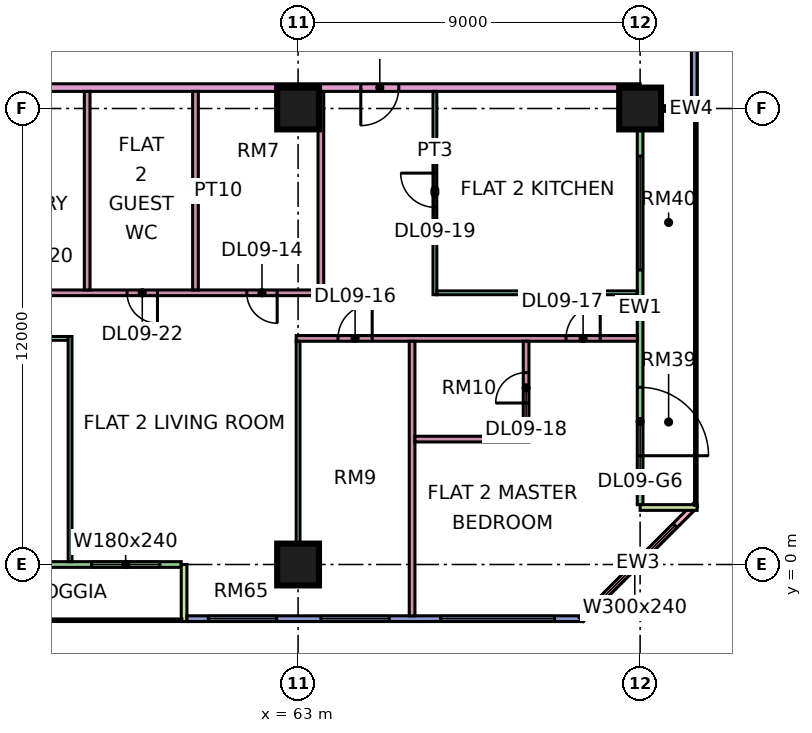
"""IFC4 building model, lengths in metres.
Left out: names, types, materials, properties, quantities, classifications, styles, units other than length and angle.
Written with IfcOpenShell. Run it as: python <this file> out.ifc"""

import sys

from ifc_helpers import new_model, si_unit, direction, frame, frame_2d, origin, origin_2d, place, context, subcontext, project, spatial, rectangle, extrude, element, fill, save


model = new_model("IFC4")
c1 = context("Model", 3, precision=1e-05, world=origin(), true_north=direction((0.0, 1.0)))
c2 = subcontext(c1, "Body", "Model", "MODEL_VIEW")
j1 = project(units=[si_unit("LENGTHUNIT", "METRE"), si_unit("PLANEANGLEUNIT", "RADIAN")], contexts=[c1])
p1 = place(None, origin())
s1 = spatial("IfcSite", under=j1, at=p1, CompositionType="ELEMENT")
p2 = place(p1, origin())
s2 = spatial("IfcBuilding", under=s1, at=p2, CompositionType="ELEMENT")
p3 = place(p2, frame((0.0, 0.0, 48.9)))
s3 = spatial("IfcBuildingStorey", under=s2, at=p3, CompositionType="ELEMENT", Elevation=48.9)
for number, where, z_axis, x_axis in (
    (1, (63.0, 0.0, 0.0), (0.0, 0.0, 1.0), (1.0, 0.0, 0.0)),
    (2, (63.0, 12.0, 0.0), (0.0, 0.0, 1.0), (1.0, 0.0, 0.0)),
    (3, (72.0, 12.0, 0.0), (0.0, 0.0, 1.0), (1.0, 0.0, 0.0)),
):
    element("IfcColumn", number, at=place(p3, frame(where, z_axis=z_axis, x_axis=x_axis)), inside=s3, PredefinedType="COLUMN", context=c2, shape_type="SweptSolid", body=[
        extrude(rectangle(XDim=1.1, YDim=1.1, at=origin_2d()), origin(), (0.0, 0.0, 1.0), 3.75),
    ])
p4 = place(p3, frame((48.075, 0.0, 0.0), z_axis=(0.0, 0.0, 1.0), x_axis=(1.0, 0.0, 0.0)))
e4 = element("IfcWall", 4, at=p4, inside=s3, PredefinedType="SOLIDWALL", context=c2, shape_type="SweptSolid", body=[
    extrude(rectangle(XDim=11.85, YDim=0.15, at=frame_2d((5.925, 0.0))), origin(), (0.0, 0.0, 1.0), 3.35),
])
p5 = place(p4, frame((0.562, 0.0, 0.45)))
e5 = element("IfcOpeningElement", 5, at=p5, cuts=e4, PredefinedType="OPENING", context=c2, shape_type="SweptSolid", body=[
    extrude(rectangle(XDim=1.8, YDim=2.4, at=frame_2d((0.9, 1.2))), frame((0.0, 0.085, 0.0), z_axis=(0.0, -1.0, 0.0), x_axis=(1.0, 0.0, 0.0)), (0.0, 0.0, 1.0), 0.17),
])
p6 = place(p4, frame((3.5, 0.0, 0.45)))
e6 = element("IfcOpeningElement", 6, at=p6, cuts=e4, PredefinedType="OPENING", context=c2, shape_type="SweptSolid", body=[
    extrude(rectangle(XDim=1.2, YDim=2.4, at=frame_2d((0.6, 1.2))), frame((0.0, 0.085, 0.0), z_axis=(0.0, -1.0, 0.0), x_axis=(1.0, 0.0, 0.0)), (0.0, 0.0, 1.0), 0.17),
])
p7 = place(p4, frame((7.15, 0.0, 0.45)))
e7 = element("IfcOpeningElement", 7, at=p7, cuts=e4, PredefinedType="OPENING", context=c2, shape_type="SweptSolid", body=[
    extrude(rectangle(XDim=1.2, YDim=2.4, at=frame_2d((0.6, 1.2))), frame((0.0, 0.085, 0.0), z_axis=(0.0, -1.0, 0.0), x_axis=(1.0, 0.0, 0.0)), (0.0, 0.0, 1.0), 0.17),
])
p8 = place(p4, frame((9.488, 0.0, 0.45)))
e8 = element("IfcOpeningElement", 8, at=p8, cuts=e4, PredefinedType="OPENING", context=c2, shape_type="SweptSolid", body=[
    extrude(rectangle(XDim=1.8, YDim=2.4, at=frame_2d((0.9, 1.2))), frame((0.0, 0.085, 0.0), z_axis=(0.0, -1.0, 0.0), x_axis=(1.0, 0.0, 0.0)), (0.0, 0.0, 1.0), 0.17),
])
p9 = place(p3, frame((60.0, -1.5, 0.0), z_axis=(0.0, 0.0, 1.0), x_axis=(0.0, 1.0, 0.0)))
e9 = element("IfcWall", 9, at=p9, inside=s3, PredefinedType="SOLIDWALL", context=c2, shape_type="SweptSolid", body=[
    extrude(rectangle(XDim=1.5, YDim=0.15, at=frame_2d((0.75, 0.0))), origin(), (0.0, 0.0, 1.0), 3.35),
])
p10 = place(p3, frame((60.075, -1.425, 0.0), z_axis=(0.0, 0.0, 1.0), x_axis=(1.0, 0.0, 0.0)))
e10 = element("IfcWall", 10, at=p10, inside=s3, PredefinedType="SOLIDWALL", context=c2, shape_type="SweptSolid", body=[
    extrude(rectangle(XDim=10.425, YDim=0.15, at=frame_2d((5.212, 0.0))), origin(), (0.0, 0.0, 1.0), 3.35),
])
p11 = place(p10, frame((0.562, 0.0, 0.45)))
e11 = element("IfcOpeningElement", 11, at=p11, cuts=e10, PredefinedType="OPENING", context=c2, shape_type="SweptSolid", body=[
    extrude(rectangle(XDim=1.8, YDim=2.4, at=frame_2d((0.9, 1.2))), frame((0.0, 0.085, 0.0), z_axis=(0.0, -1.0, 0.0), x_axis=(1.0, 0.0, 0.0)), (0.0, 0.0, 1.0), 0.17),
])
p12 = place(p10, frame((3.525, 0.0, 0.45)))
e12 = element("IfcOpeningElement", 12, at=p12, cuts=e10, PredefinedType="OPENING", context=c2, shape_type="SweptSolid", body=[
    extrude(rectangle(XDim=1.8, YDim=2.4, at=frame_2d((0.9, 1.2))), frame((0.0, 0.085, 0.0), z_axis=(0.0, -1.0, 0.0), x_axis=(1.0, 0.0, 0.0)), (0.0, 0.0, 1.0), 0.17),
])
p13 = place(p10, frame((6.675, 0.0, 0.45)))
e13 = element("IfcOpeningElement", 13, at=p13, cuts=e10, PredefinedType="OPENING", context=c2, shape_type="SweptSolid", body=[
    extrude(rectangle(XDim=3.0, YDim=2.4, at=frame_2d((1.5, 1.2))), frame((0.0, 0.085, 0.0), z_axis=(0.0, -1.0, 0.0), x_axis=(1.0, 0.0, 0.0)), (0.0, 0.0, 1.0), 0.17),
])
p14 = place(p3, frame((70.447, -1.447, 0.0), z_axis=(0.0, 0.0, 1.0), x_axis=(0.707106781187, 0.707106781187, 0.0)))
e14 = element("IfcWall", 14, at=p14, inside=s3, PredefinedType="SOLIDWALL", context=c2, shape_type="SweptSolid", body=[
    extrude(rectangle(XDim=4.243, YDim=0.15, at=frame_2d((2.121, 0.0))), origin(), (0.0, 0.0, 1.0), 3.35),
])
p15 = place(p14, frame((0.498, 0.0, 0.45)))
e15 = element("IfcOpeningElement", 15, at=p15, cuts=e14, PredefinedType="OPENING", context=c2, shape_type="SweptSolid", body=[
    extrude(rectangle(XDim=3.0, YDim=2.4, at=frame_2d((1.5, 1.2))), frame((0.0, 0.085, 0.0), z_axis=(0.0, -1.0, 0.0), x_axis=(1.0, 0.0, 0.0)), (0.0, 0.0, 1.0), 0.17),
])
p16 = place(p3, frame((72.0, 1.575, 0.0), z_axis=(0.0, 0.0, 1.0), x_axis=(0.0, 1.0, 0.0)))
e16 = element("IfcWall", 16, at=p16, inside=s3, PredefinedType="SOLIDWALL", context=c2, shape_type="SweptSolid", body=[
    extrude(rectangle(XDim=10.35, YDim=0.15, at=frame_2d((5.175, 0.0))), origin(), (0.0, 0.0, 1.0), 3.35),
])
p17 = place(p16, frame((1.288, 0.0, 0.0)))
e17 = element("IfcOpeningElement", 17, at=p17, cuts=e16, PredefinedType="OPENING", context=c2, shape_type="SweptSolid", body=[
    extrude(rectangle(XDim=1.8, YDim=2.4, at=frame_2d((0.9, 1.2))), frame((0.0, 0.085, 0.0), z_axis=(0.0, -1.0, 0.0), x_axis=(1.0, 0.0, 0.0)), (0.0, 0.0, 1.0), 0.17),
])
p18 = place(p16, frame((6.175, 0.0, 0.45)))
e18 = element("IfcOpeningElement", 18, at=p18, cuts=e16, PredefinedType="OPENING", context=c2, shape_type="SweptSolid", body=[
    extrude(rectangle(XDim=3.0, YDim=2.4, at=frame_2d((1.5, 1.2))), frame((0.0, 0.085, 0.0), z_axis=(0.0, -1.0, 0.0), x_axis=(1.0, 0.0, 0.0)), (0.0, 0.0, 1.0), 0.17),
])
for number, where, z_axis, x_axis in (
    (19, (73.5, 1.5, 0.0), (0.0, 0.0, 1.0), (-1.0, 0.0, 0.0)),
    (20, (73.5, 12.0, 0.0), (0.0, 0.0, 1.0), (-1.0, 0.0, 0.0)),
):
    element("IfcWall", number, at=place(p3, frame(where, z_axis=z_axis, x_axis=x_axis)), inside=s3, PredefinedType="SOLIDWALL", context=c2, shape_type="SweptSolid", body=[
        extrude(rectangle(XDim=1.5, YDim=0.15, at=frame_2d((0.75, 0.0))), origin(), (0.0, 0.0, 1.0), 3.35),
    ])
p19 = place(p3, frame((73.425, 12.075, 0.0), z_axis=(0.0, 0.0, 1.0), x_axis=(0.0, 1.0, 0.0)))
e21 = element("IfcWall", 21, at=p19, inside=s3, PredefinedType="SOLIDWALL", context=c2, shape_type="SweptSolid", body=[
    extrude(rectangle(XDim=10.425, YDim=0.15, at=frame_2d((5.212, 0.0))), origin(), (0.0, 0.0, 1.0), 3.35),
])
p20 = place(p19, frame((8.025, 0.0, 0.45)))
e22 = element("IfcOpeningElement", 22, at=p20, cuts=e21, PredefinedType="OPENING", context=c2, shape_type="SweptSolid", body=[
    extrude(rectangle(XDim=1.8, YDim=2.4, at=frame_2d((0.9, 1.2))), frame((0.0, 0.085, 0.0), z_axis=(0.0, -1.0, 0.0), x_axis=(1.0, 0.0, 0.0)), (0.0, 0.0, 1.0), 0.17),
])
p21 = place(p3, frame((40.65, 12.55, 0.0), z_axis=(0.0, 0.0, 1.0), x_axis=(1.0, 0.0, 0.0)))
e23 = element("IfcWall", 23, at=p21, inside=s3, PredefinedType="PARTITIONING", context=c2, shape_type="SweptSolid", body=[
    extrude(rectangle(XDim=31.35, YDim=0.2, at=frame_2d((15.675, 0.0))), origin(), (0.0, 0.0, 1.0), 3.35),
])
p22 = place(p21, frame((24.0, 0.0, 0.0)))
e24 = element("IfcOpeningElement", 24, at=p22, cuts=e23, PredefinedType="OPENING", context=c2, shape_type="SweptSolid", body=[
    extrude(rectangle(XDim=1.0, YDim=2.1, at=frame_2d((0.5, 1.05))), frame((0.0, 0.11, 0.0), z_axis=(0.0, -1.0, 0.0), x_axis=(1.0, 0.0, 0.0)), (0.0, 0.0, 1.0), 0.22),
])
p23 = place(p21, frame((1.05, 0.0, 0.0)))
e25 = element("IfcOpeningElement", 25, at=p23, cuts=e23, PredefinedType="OPENING", context=c2, shape_type="SweptSolid", body=[
    extrude(rectangle(XDim=1.0, YDim=2.1, at=frame_2d((0.5, 1.05))), frame((0.0, 0.11, 0.0), z_axis=(0.0, -1.0, 0.0), x_axis=(1.0, 0.0, 0.0)), (0.0, 0.0, 1.0), 0.22),
])
p24 = place(p3, frame((54.1, 5.95, 0.0), z_axis=(0.0, 0.0, 1.0), x_axis=(1.0, 0.0, 0.0)))
e26 = element("IfcWall", 26, at=p24, inside=s3, PredefinedType="PARTITIONING", context=c2, shape_type="SweptSolid", body=[
    extrude(rectangle(XDim=2.85, YDim=0.1, at=frame_2d((1.425, 0.0))), origin(), (0.0, 0.0, 1.0), 3.35),
])
p25 = place(p24, frame((0.95, 0.0, 0.0)))
e27 = element("IfcOpeningElement", 27, at=p25, cuts=e26, PredefinedType="OPENING", context=c2, shape_type="SweptSolid", body=[
    extrude(rectangle(XDim=0.9, YDim=2.1, at=frame_2d((0.45, 1.05))), frame((0.0, 0.06, 0.0), z_axis=(0.0, -1.0, 0.0), x_axis=(1.0, 0.0, 0.0)), (0.0, 0.0, 1.0), 0.12),
])
p26 = place(p3, frame((54.1, 7.15, 0.0), z_axis=(0.0, 0.0, 1.0), x_axis=(1.0, 0.0, 0.0)))
e28 = element("IfcWall", 28, at=p26, inside=s3, PredefinedType="PARTITIONING", context=c2, shape_type="SweptSolid", body=[
    extrude(rectangle(XDim=9.575, YDim=0.15, at=frame_2d((4.788, 0.0))), origin(), (0.0, 0.0, 1.0), 3.35),
])
p27 = place(p26, frame((7.55, 0.0, 0.0)))
e29 = element("IfcOpeningElement", 29, at=p27, cuts=e28, PredefinedType="OPENING", context=c2, shape_type="SweptSolid", body=[
    extrude(rectangle(XDim=0.8, YDim=2.1, at=frame_2d((0.4, 1.05))), frame((0.0, 0.085, 0.0), z_axis=(0.0, -1.0, 0.0), x_axis=(1.0, 0.0, 0.0)), (0.0, 0.0, 1.0), 0.17),
])
p28 = place(p26, frame((0.95, 0.0, 0.0)))
e30 = element("IfcOpeningElement", 30, at=p28, cuts=e28, PredefinedType="OPENING", context=c2, shape_type="SweptSolid", body=[
    extrude(rectangle(XDim=0.8, YDim=2.1, at=frame_2d((0.4, 1.05))), frame((0.0, 0.085, 0.0), z_axis=(0.0, -1.0, 0.0), x_axis=(1.0, 0.0, 0.0)), (0.0, 0.0, 1.0), 0.17),
])
p29 = place(p26, frame((4.4, 0.0, 0.0)))
e31 = element("IfcOpeningElement", 31, at=p29, cuts=e28, PredefinedType="OPENING", context=c2, shape_type="SweptSolid", body=[
    extrude(rectangle(XDim=0.8, YDim=2.1, at=frame_2d((0.4, 1.05))), frame((0.0, 0.085, 0.0), z_axis=(0.0, -1.0, 0.0), x_axis=(1.0, 0.0, 0.0)), (0.0, 0.0, 1.0), 0.17),
])
p30 = place(p3, frame((57.0, 0.074, 0.0), z_axis=(0.0, 0.0, 1.0), x_axis=(0.0, 1.0, 0.0)))
e32 = element("IfcWall", 32, at=p30, inside=s3, PredefinedType="PARTITIONING", context=c2, shape_type="SweptSolid", body=[
    extrude(rectangle(XDim=5.926, YDim=0.1, at=frame_2d((2.963, 0.0))), origin(), (0.0, 0.0, 1.0), 3.35),
])
for number, where, z_axis, x_axis in (
    (33, (57.45, 7.225, 0.0), (0.0, 0.0, 1.0), (0.0, 1.0, 0.0)),
    (34, (60.3, 7.225, 0.0), (0.0, 0.0, 1.0), (0.0, 1.0, 0.0)),
):
    element("IfcWall", number, at=place(p3, frame(where, z_axis=z_axis, x_axis=x_axis)), inside=s3, PredefinedType="PARTITIONING", context=c2, shape_type="SweptSolid", body=[
        extrude(rectangle(XDim=5.225, YDim=0.15, at=frame_2d((2.612, 0.0))), origin(), (0.0, 0.0, 1.0), 3.35),
    ])
p31 = place(p3, frame((62.95, 5.95, 0.0), z_axis=(0.0, 0.0, 1.0), x_axis=(1.0, 0.0, 0.0)))
e35 = element("IfcWall", 35, at=p31, inside=s3, PredefinedType="PARTITIONING", context=c2, shape_type="SweptSolid", body=[
    extrude(rectangle(XDim=8.976, YDim=0.15, at=frame_2d((4.488, 0.0))), origin(), (0.0, 0.0, 1.0), 3.35),
])
p32 = place(p31, frame((1.1, 0.0, 0.0)))
e36 = element("IfcOpeningElement", 36, at=p32, cuts=e35, PredefinedType="OPENING", context=c2, shape_type="SweptSolid", body=[
    extrude(rectangle(XDim=0.9, YDim=2.1, at=frame_2d((0.45, 1.05))), frame((0.0, 0.085, 0.0), z_axis=(0.0, -1.0, 0.0), x_axis=(1.0, 0.0, 0.0)), (0.0, 0.0, 1.0), 0.17),
])
p33 = place(p31, frame((7.1, 0.0, 0.0)))
e37 = element("IfcOpeningElement", 37, at=p33, cuts=e35, PredefinedType="OPENING", context=c2, shape_type="SweptSolid", body=[
    extrude(rectangle(XDim=0.9, YDim=2.1, at=frame_2d((0.45, 1.05))), frame((0.0, 0.085, 0.0), z_axis=(0.0, -1.0, 0.0), x_axis=(1.0, 0.0, 0.0)), (0.0, 0.0, 1.0), 0.17),
])
p34 = place(p3, frame((63.0, 0.0, 0.0), z_axis=(0.0, 0.0, 1.0), x_axis=(0.0, 1.0, 0.0)))
e38 = element("IfcWall", 38, at=p34, inside=s3, PredefinedType="PARTITIONING", context=c2, shape_type="SweptSolid", body=[
    extrude(rectangle(XDim=5.875, YDim=0.1, at=frame_2d((2.938, 0.0))), origin(), (0.0, 0.0, 1.0), 3.35),
])
p35 = place(p3, frame((63.6, 7.225, 0.0), z_axis=(0.0, 0.0, 1.0), x_axis=(0.0, 1.0, 0.0)))
e39 = element("IfcWall", 39, at=p35, inside=s3, PredefinedType="PARTITIONING", context=c2, shape_type="SweptSolid", body=[
    extrude(rectangle(XDim=5.225, YDim=0.15, at=frame_2d((2.612, 0.0))), origin(), (0.0, 0.0, 1.0), 3.35),
])
p36 = place(p3, frame((66.0, -1.351, 0.0), z_axis=(0.0, 0.0, 1.0), x_axis=(0.0, 1.0, 0.0)))
e40 = element("IfcWall", 40, at=p36, inside=s3, PredefinedType="PARTITIONING", context=c2, shape_type="SweptSolid", body=[
    extrude(rectangle(XDim=7.226, YDim=0.15, at=frame_2d((3.613, 0.0))), origin(), (0.0, 0.0, 1.0), 3.35),
])
p37 = place(p3, frame((66.075, 3.3, 0.0), z_axis=(0.0, 0.0, 1.0), x_axis=(1.0, 0.0, 0.0)))
e41 = element("IfcWall", 41, at=p37, inside=s3, PredefinedType="PARTITIONING", context=c2, shape_type="SweptSolid", body=[
    extrude(rectangle(XDim=3.0, YDim=0.15, at=frame_2d((1.5, 0.0))), origin(), (0.0, 0.0, 1.0), 3.35),
])
p38 = place(p3, frame((66.6, 7.1, 0.0), z_axis=(0.0, 0.0, 1.0), x_axis=(0.0, 1.0, 0.0)))
e42 = element("IfcWall", 42, at=p38, inside=s3, PredefinedType="PARTITIONING", context=c2, shape_type="SweptSolid", body=[
    extrude(rectangle(XDim=5.35, YDim=0.1, at=frame_2d((2.675, 0.0))), origin(), (0.0, 0.0, 1.0), 3.35),
])
p39 = place(p38, frame((2.3, 0.0, 0.0)))
e43 = element("IfcOpeningElement", 43, at=p39, cuts=e42, PredefinedType="OPENING", context=c2, shape_type="SweptSolid", body=[
    extrude(rectangle(XDim=0.9, YDim=2.1, at=frame_2d((0.45, 1.05))), frame((0.0, 0.06, 0.0), z_axis=(0.0, -1.0, 0.0), x_axis=(1.0, 0.0, 0.0)), (0.0, 0.0, 1.0), 0.12),
])
p40 = place(p3, frame((66.65, 7.15, 0.0), z_axis=(0.0, 0.0, 1.0), x_axis=(1.0, 0.0, 0.0)))
e44 = element("IfcWall", 44, at=p40, inside=s3, PredefinedType="PARTITIONING", context=c2, shape_type="SweptSolid", body=[
    extrude(rectangle(XDim=5.276, YDim=0.1, at=frame_2d((2.638, 0.0))), origin(), (0.0, 0.0, 1.0), 3.35),
])
p41 = place(p3, frame((69.0, 3.375, 0.0), z_axis=(0.0, 0.0, 1.0), x_axis=(0.0, 1.0, 0.0)))
e45 = element("IfcWall", 45, at=p41, inside=s3, PredefinedType="PARTITIONING", context=c2, shape_type="SweptSolid", body=[
    extrude(rectangle(XDim=2.5, YDim=0.15, at=frame_2d((1.25, 0.0))), origin(), (0.0, 0.0, 1.0), 3.35),
])
p42 = place(p41, frame((0.875, 0.0, 0.0)))
e46 = element("IfcOpeningElement", 46, at=p42, cuts=e45, PredefinedType="OPENING", context=c2, shape_type="SweptSolid", body=[
    extrude(rectangle(XDim=0.8, YDim=2.1, at=frame_2d((0.4, 1.05))), frame((0.0, 0.085, 0.0), z_axis=(0.0, -1.0, 0.0), x_axis=(1.0, 0.0, 0.0)), (0.0, 0.0, 1.0), 0.17),
])
p43 = place(p8, origin())
e47 = element("IfcWindow", 47, at=p43, inside=s3, PartitioningType="SINGLE_PANEL", PredefinedType="WINDOW", context=c2, shape_type="SweptSolid", body=[
    extrude(rectangle(XDim=1.8, YDim=2.4, at=frame_2d((0.9, 1.2))), frame((0.0, 0.03, 0.0), z_axis=(0.0, -1.0, 0.0), x_axis=(1.0, 0.0, 0.0)), (0.0, 0.0, 1.0), 0.06),
])
fill(e8, e47)
p44 = place(p11, origin())
e48 = element("IfcWindow", 48, at=p44, inside=s3, PartitioningType="SINGLE_PANEL", PredefinedType="WINDOW", context=c2, shape_type="SweptSolid", body=[
    extrude(rectangle(XDim=1.8, YDim=2.4, at=frame_2d((0.9, 1.2))), frame((0.0, 0.03, 0.0), z_axis=(0.0, -1.0, 0.0), x_axis=(1.0, 0.0, 0.0)), (0.0, 0.0, 1.0), 0.06),
])
fill(e11, e48)
p45 = place(p12, origin())
e49 = element("IfcWindow", 49, at=p45, inside=s3, PartitioningType="SINGLE_PANEL", PredefinedType="WINDOW", context=c2, shape_type="SweptSolid", body=[
    extrude(rectangle(XDim=1.8, YDim=2.4, at=frame_2d((0.9, 1.2))), frame((0.0, 0.03, 0.0), z_axis=(0.0, -1.0, 0.0), x_axis=(1.0, 0.0, 0.0)), (0.0, 0.0, 1.0), 0.06),
])
fill(e12, e49)
p46 = place(p13, origin())
e50 = element("IfcWindow", 50, at=p46, inside=s3, PartitioningType="SINGLE_PANEL", PredefinedType="WINDOW", context=c2, shape_type="SweptSolid", body=[
    extrude(rectangle(XDim=3.0, YDim=2.4, at=frame_2d((1.5, 1.2))), frame((0.0, 0.03, 0.0), z_axis=(0.0, -1.0, 0.0), x_axis=(1.0, 0.0, 0.0)), (0.0, 0.0, 1.0), 0.06),
])
fill(e13, e50)
p47 = place(p15, origin())
e51 = element("IfcWindow", 51, at=p47, inside=s3, PartitioningType="SINGLE_PANEL", PredefinedType="WINDOW", context=c2, shape_type="SweptSolid", body=[
    extrude(rectangle(XDim=3.0, YDim=2.4, at=frame_2d((1.5, 1.2))), frame((0.0, 0.03, 0.0), z_axis=(0.0, -1.0, 0.0), x_axis=(1.0, 0.0, 0.0)), (0.0, 0.0, 1.0), 0.06),
])
fill(e15, e51)
p48 = place(p17, frame((1.8, 0.0, 0.0), z_axis=(0.0, 0.0, 1.0), x_axis=(-1.0, 0.0, 0.0)))
e52 = element("IfcDoor", 52, at=p48, inside=s3, OperationType="DOUBLE_DOOR_SINGLE_SWING", PredefinedType="DOOR", context=c2, shape_type="SweptSolid", body=[
    extrude(rectangle(XDim=1.8, YDim=2.4, at=frame_2d((0.9, 1.2))), frame((0.0, 0.025, 0.0), z_axis=(0.0, -1.0, 0.0), x_axis=(1.0, 0.0, 0.0)), (0.0, 0.0, 1.0), 0.05),
])
fill(e17, e52)
p49 = place(p18, origin())
e53 = element("IfcWindow", 53, at=p49, inside=s3, PartitioningType="SINGLE_PANEL", PredefinedType="WINDOW", context=c2, shape_type="SweptSolid", body=[
    extrude(rectangle(XDim=3.0, YDim=2.4, at=frame_2d((1.5, 1.2))), frame((0.0, 0.03, 0.0), z_axis=(0.0, -1.0, 0.0), x_axis=(1.0, 0.0, 0.0)), (0.0, 0.0, 1.0), 0.06),
])
fill(e18, e53)
p50 = place(p27, origin())
e54 = element("IfcDoor", 54, at=p50, inside=s3, OperationType="SINGLE_SWING_RIGHT", PredefinedType="DOOR", context=c2, shape_type="SweptSolid", body=[
    extrude(rectangle(XDim=0.8, YDim=2.1, at=frame_2d((0.4, 1.05))), frame((0.0, 0.025, 0.0), z_axis=(0.0, -1.0, 0.0), x_axis=(1.0, 0.0, 0.0)), (0.0, 0.0, 1.0), 0.05),
])
fill(e29, e54)
p51 = place(p32, frame((0.9, 0.0, 0.0), z_axis=(0.0, 0.0, 1.0), x_axis=(-1.0, 0.0, 0.0)))
e55 = element("IfcDoor", 55, at=p51, inside=s3, OperationType="SINGLE_SWING_RIGHT", PredefinedType="DOOR", context=c2, shape_type="SweptSolid", body=[
    extrude(rectangle(XDim=0.9, YDim=2.1, at=frame_2d((0.45, 1.05))), frame((0.0, 0.025, 0.0), z_axis=(0.0, -1.0, 0.0), x_axis=(1.0, 0.0, 0.0)), (0.0, 0.0, 1.0), 0.05),
])
fill(e36, e55)
p52 = place(p33, frame((0.9, 0.0, 0.0), z_axis=(0.0, 0.0, 1.0), x_axis=(-1.0, 0.0, 0.0)))
e56 = element("IfcDoor", 56, at=p52, inside=s3, OperationType="SINGLE_SWING_RIGHT", PredefinedType="DOOR", context=c2, shape_type="SweptSolid", body=[
    extrude(rectangle(XDim=0.9, YDim=2.1, at=frame_2d((0.45, 1.05))), frame((0.0, 0.025, 0.0), z_axis=(0.0, -1.0, 0.0), x_axis=(1.0, 0.0, 0.0)), (0.0, 0.0, 1.0), 0.05),
])
fill(e37, e56)
p53 = place(p42, origin())
e57 = element("IfcDoor", 57, at=p53, inside=s3, OperationType="SINGLE_SWING_LEFT", PredefinedType="DOOR", context=c2, shape_type="SweptSolid", body=[
    extrude(rectangle(XDim=0.8, YDim=2.1, at=frame_2d((0.4, 1.05))), frame((0.0, 0.025, 0.0), z_axis=(0.0, -1.0, 0.0), x_axis=(1.0, 0.0, 0.0)), (0.0, 0.0, 1.0), 0.05),
])
fill(e46, e57)
p54 = place(p39, frame((0.9, 0.0, 0.0), z_axis=(0.0, 0.0, 1.0), x_axis=(-1.0, 0.0, 0.0)))
e58 = element("IfcDoor", 58, at=p54, inside=s3, OperationType="SINGLE_SWING_RIGHT", PredefinedType="DOOR", context=c2, shape_type="SweptSolid", body=[
    extrude(rectangle(XDim=0.9, YDim=2.1, at=frame_2d((0.45, 1.05))), frame((0.0, 0.025, 0.0), z_axis=(0.0, -1.0, 0.0), x_axis=(1.0, 0.0, 0.0)), (0.0, 0.0, 1.0), 0.05),
])
fill(e43, e58)
p55 = place(p22, frame((1.0, 0.0, 0.0), z_axis=(0.0, 0.0, 1.0), x_axis=(-1.0, 0.0, 0.0)))
e59 = element("IfcDoor", 59, at=p55, inside=s3, OperationType="SINGLE_SWING_LEFT", PredefinedType="DOOR", context=c2, shape_type="SweptSolid", body=[
    extrude(rectangle(XDim=1.0, YDim=2.1, at=frame_2d((0.5, 1.05))), frame((0.0, 0.025, 0.0), z_axis=(0.0, -1.0, 0.0), x_axis=(1.0, 0.0, 0.0)), (0.0, 0.0, 1.0), 0.05),
])
fill(e24, e59)
p56 = place(p29, origin())
e60 = element("IfcDoor", 60, at=p56, inside=s3, OperationType="SINGLE_SWING_RIGHT", PredefinedType="DOOR", context=c2, shape_type="SweptSolid", body=[
    extrude(rectangle(XDim=0.8, YDim=2.1, at=frame_2d((0.4, 1.05))), frame((0.0, 0.025, 0.0), z_axis=(0.0, -1.0, 0.0), x_axis=(1.0, 0.0, 0.0)), (0.0, 0.0, 1.0), 0.05),
])
fill(e31, e60)
save(model, sys.argv[1])
